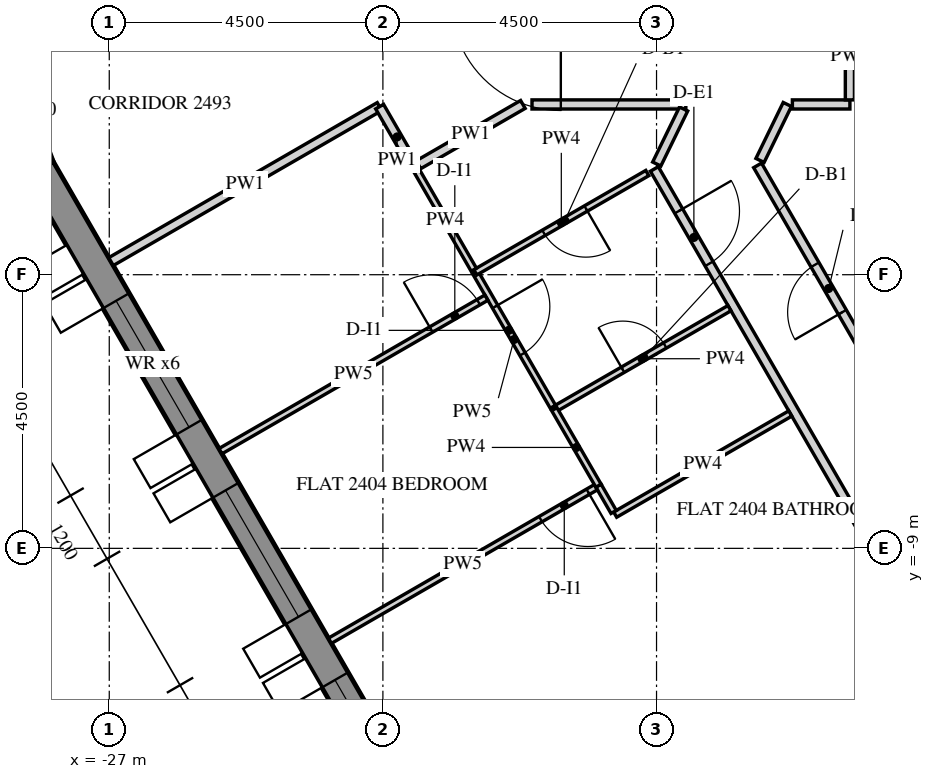
"""IFC4 building model, lengths in metres.
Left out: names, types, materials, properties, quantities, classifications, styles, units other than length and angle.
Written with IfcOpenShell. Run it as: python <this file> out.ifc"""

import sys

from ifc_helpers import new_model, si_unit, direction, frame, frame_2d, origin, place, context, subcontext, project, spatial, polyline, rectangle, outline, extrude, element, fill, save


model = new_model("IFC4")
c1 = context("Model", 3, precision=1e-05, world=origin(), true_north=direction((0.0, 1.0)))
c2 = subcontext(c1, "Body", "Model", "MODEL_VIEW")
j1 = project(units=[si_unit("LENGTHUNIT", "METRE"), si_unit("PLANEANGLEUNIT", "RADIAN")], contexts=[c1])
p1 = place(None, origin())
s1 = spatial("IfcSite", under=j1, at=p1, CompositionType="ELEMENT")
p2 = place(p1, origin())
s2 = spatial("IfcBuilding", under=s1, at=p2, CompositionType="ELEMENT")
p3 = place(p2, frame((0.0, 0.0, 303.0)))
s3 = spatial("IfcBuildingStorey", under=s2, at=p3, CompositionType="ELEMENT", Elevation=303.0)
p4 = place(p3, frame((-28.578, -1.606, -0.15), z_axis=(0.0, 0.0, 1.0), x_axis=(0.352838463023, -0.935684251771, 0.0)))
e1 = element("IfcWall", 1, at=p4, inside=s3, PredefinedType="SOLIDWALL", context=c2, shape_type="SweptSolid", body=[
    extrude(outline(polyline([(-0.041, -0.25), (1.237, -0.25), (1.196, 0.25), (0.041, 0.25), (-0.041, -0.25)])), origin(), (0.0, 0.0, 1.0), 3.9),
])
p5 = place(p3, frame((-28.149, -2.745, -0.15), z_axis=(0.0, 0.0, 1.0), x_axis=(0.500003737743, -0.866023245787, 0.0)))
e2 = element("IfcWall", 2, at=p5, inside=s3, PredefinedType="SOLIDWALL", context=c2, shape_type="SweptSolid", body=[
    extrude(outline(polyline([(-0.021, -0.25), (25.468, -0.25), (25.421, 0.25), (0.021, 0.25), (-0.021, -0.25)])), origin(), (0.0, 0.0, 1.0), 3.9),
])
p6 = place(p5, frame((2.522, 0.0, 0.75)))
e3 = element("IfcOpeningElement", 3, at=p6, cuts=e2, PredefinedType="OPENING", context=c2, shape_type="SweptSolid", body=[
    extrude(rectangle(XDim=2.4, YDim=2.7, at=frame_2d((1.2, 1.35))), frame((0.0, 0.26, 0.0), z_axis=(0.0, -1.0, 0.0), x_axis=(1.0, 0.0, 0.0)), (0.0, 0.0, 1.0), 0.52),
])
p7 = place(p5, frame((6.122, 0.0, 0.75)))
e4 = element("IfcOpeningElement", 4, at=p7, cuts=e2, PredefinedType="OPENING", context=c2, shape_type="SweptSolid", body=[
    extrude(rectangle(XDim=2.4, YDim=2.7, at=frame_2d((1.2, 1.35))), frame((0.0, 0.26, 0.0), z_axis=(0.0, -1.0, 0.0), x_axis=(1.0, 0.0, 0.0)), (0.0, 0.0, 1.0), 0.52),
])
p8 = place(p5, frame((9.722, 0.0, 0.75)))
e5 = element("IfcOpeningElement", 5, at=p8, cuts=e2, PredefinedType="OPENING", context=c2, shape_type="SweptSolid", body=[
    extrude(rectangle(XDim=2.4, YDim=2.7, at=frame_2d((1.2, 1.35))), frame((0.0, 0.26, 0.0), z_axis=(0.0, -1.0, 0.0), x_axis=(1.0, 0.0, 0.0)), (0.0, 0.0, 1.0), 0.52),
])
p9 = place(p5, frame((13.323, 0.0, 0.75)))
e6 = element("IfcOpeningElement", 6, at=p9, cuts=e2, PredefinedType="OPENING", context=c2, shape_type="SweptSolid", body=[
    extrude(rectangle(XDim=2.4, YDim=2.7, at=frame_2d((1.2, 1.35))), frame((0.0, 0.26, 0.0), z_axis=(0.0, -1.0, 0.0), x_axis=(1.0, 0.0, 0.0)), (0.0, 0.0, 1.0), 0.52),
])
p10 = place(p5, frame((16.922, 0.0, 0.75)))
e7 = element("IfcOpeningElement", 7, at=p10, cuts=e2, PredefinedType="OPENING", context=c2, shape_type="SweptSolid", body=[
    extrude(rectangle(XDim=2.4, YDim=2.7, at=frame_2d((1.2, 1.35))), frame((0.0, 0.26, 0.0), z_axis=(0.0, -1.0, 0.0), x_axis=(1.0, 0.0, 0.0)), (0.0, 0.0, 1.0), 0.52),
])
p11 = place(p5, frame((20.522, 0.0, 0.75)))
e8 = element("IfcOpeningElement", 8, at=p11, cuts=e2, PredefinedType="OPENING", context=c2, shape_type="SweptSolid", body=[
    extrude(rectangle(XDim=2.4, YDim=2.7, at=frame_2d((1.2, 1.35))), frame((0.0, 0.26, 0.0), z_axis=(0.0, -1.0, 0.0), x_axis=(1.0, 0.0, 0.0)), (0.0, 0.0, 1.0), 0.52),
])
p12 = place(p3, frame((-18.036, -2.761, 0.0), z_axis=(0.0, 0.0, 1.0), x_axis=(0.499996279807, -0.866027551628, 0.0)))
e9 = element("IfcWall", 9, at=p12, inside=s3, PredefinedType="PARTITIONING", context=c2, shape_type="SweptSolid", body=[
    extrude(rectangle(XDim=15.024, YDim=0.15, at=frame_2d((7.512, 0.0))), origin(), (0.0, 0.0, 1.0), 2.988),
])
p13 = place(p12, frame((0.8, 0.0, 0.0)))
e10 = element("IfcOpeningElement", 10, at=p13, cuts=e9, PredefinedType="OPENING", context=c2, shape_type="SweptSolid", body=[
    extrude(rectangle(XDim=1.0, YDim=2.1, at=frame_2d((0.5, 1.05))), frame((0.0, 0.085, 0.0), z_axis=(0.0, -1.0, 0.0), x_axis=(1.0, 0.0, 0.0)), (0.0, 0.0, 1.0), 0.17),
])
p14 = place(p12, frame((13.874, 0.0, 0.0)))
e11 = element("IfcOpeningElement", 11, at=p14, cuts=e9, PredefinedType="OPENING", context=c2, shape_type="SweptSolid", body=[
    extrude(rectangle(XDim=1.0, YDim=2.1, at=frame_2d((0.5, 1.05))), frame((0.0, 0.085, 0.0), z_axis=(0.0, -1.0, 0.0), x_axis=(1.0, 0.0, 0.0)), (0.0, 0.0, 1.0), 0.17),
])
p15 = place(p3, frame((-26.971, -4.284, 0.0), z_axis=(0.0, 0.0, 1.0), x_axis=(0.866024511559, 0.500001545377, 0.0)))
e12 = element("IfcWall", 12, at=p15, inside=s3, PredefinedType="PARTITIONING", context=c2, shape_type="SweptSolid", body=[
    extrude(rectangle(XDim=5.099, YDim=0.15, at=frame_2d((2.549, 0.0))), origin(), (0.0, 0.0, 1.0), 2.988),
])
p16 = place(p3, frame((-22.554, -1.736, 0.0), z_axis=(0.0, 0.0, 1.0), x_axis=(0.500040764516, -0.866001867101, 0.0)))
e13 = element("IfcWall", 13, at=p16, inside=s3, PredefinedType="PARTITIONING", context=c2, shape_type="SweptSolid", body=[
    extrude(rectangle(XDim=1.151, YDim=0.15, at=frame_2d((0.575, 0.0))), origin(), (0.0, 0.0, 1.0), 2.988),
])
p17 = place(p3, frame((-21.915, -2.692, 0.0), z_axis=(0.0, 0.0, 1.0), x_axis=(0.866007234284, 0.500031469177, 0.0)))
e14 = element("IfcWall", 14, at=p17, inside=s3, PredefinedType="PARTITIONING", context=c2, shape_type="SweptSolid", body=[
    extrude(rectangle(XDim=1.983, YDim=0.15, at=frame_2d((0.992, 0.0))), origin(), (0.0, 0.0, 1.0), 2.988),
])
p18 = place(p3, frame((-20.048, -1.7, 0.0), z_axis=(0.0, 0.0, 1.0), x_axis=(1.0, 0.0, 0.0)))
e15 = element("IfcWall", 15, at=p18, inside=s3, PredefinedType="PARTITIONING", context=c2, shape_type="SweptSolid", body=[
    extrude(rectangle(XDim=2.53, YDim=0.15, at=frame_2d((1.265, 0.0))), origin(), (0.0, 0.0, 1.0), 2.988),
])
p19 = place(p3, frame((-17.555, -1.775, 0.0), z_axis=(0.0, 0.0, 1.0), x_axis=(-0.438366307753, -0.898796406439, 0.0)))
e16 = element("IfcWall", 16, at=p19, inside=s3, PredefinedType="PARTITIONING", context=c2, shape_type="SweptSolid", body=[
    extrude(rectangle(XDim=1.007, YDim=0.15, at=frame_2d((0.503, 0.0))), origin(), (0.0, 0.0, 1.0), 2.988),
])
p20 = place(p3, frame((-14.0, -6.751, 0.0), z_axis=(0.0, 0.0, 1.0), x_axis=(-0.500008739126, 0.866020358189, 0.0)))
e17 = element("IfcWall", 17, at=p20, inside=s3, PredefinedType="PARTITIONING", context=c2, shape_type="SweptSolid", body=[
    extrude(rectangle(XDim=4.675, YDim=0.15, at=frame_2d((2.338, 0.0))), origin(), (0.0, 0.0, 1.0), 2.988),
])
p21 = place(p20, frame((1.888, 0.0, 0.0)))
e18 = element("IfcOpeningElement", 18, at=p21, cuts=e17, PredefinedType="OPENING", context=c2, shape_type="SweptSolid", body=[
    extrude(rectangle(XDim=0.9, YDim=2.1, at=frame_2d((0.45, 1.05))), frame((0.0, 0.085, 0.0), z_axis=(0.0, -1.0, 0.0), x_axis=(1.0, 0.0, 0.0)), (0.0, 0.0, 1.0), 0.17),
])
p22 = place(p3, frame((-16.298, -2.621, 0.0), z_axis=(0.0, 0.0, 1.0), x_axis=(0.438325013788, 0.898816545402, 0.0)))
e19 = element("IfcWall", 19, at=p22, inside=s3, PredefinedType="PARTITIONING", context=c2, shape_type="SweptSolid", body=[
    extrude(rectangle(XDim=1.024, YDim=0.15, at=frame_2d((0.512, 0.0))), origin(), (0.0, 0.0, 1.0), 2.988),
])
p23 = place(p3, frame((-15.766, -1.7, 0.0), z_axis=(0.0, 0.0, 1.0), x_axis=(1.0, 0.0, 0.0)))
e20 = element("IfcWall", 20, at=p23, inside=s3, PredefinedType="PARTITIONING", context=c2, shape_type="SweptSolid", body=[
    extrude(rectangle(XDim=0.946, YDim=0.15, at=frame_2d((0.473, 0.0))), origin(), (0.0, 0.0, 1.0), 2.988),
])
p24 = place(p3, frame((-14.82, -1.625, 0.0), z_axis=(0.0, 0.0, 1.0), x_axis=(0.0, 1.0, 0.0)))
e21 = element("IfcWall", 21, at=p24, inside=s3, PredefinedType="PARTITIONING", context=c2, shape_type="SweptSolid", body=[
    extrude(rectangle(XDim=1.425, YDim=0.15, at=frame_2d((0.712, 0.0))), origin(), (0.0, 0.0, 1.0), 2.988),
])
p25 = place(p3, frame((-15.801, -6.782, 0.0), z_axis=(0.0, 0.0, 1.0), x_axis=(-0.866033959199, -0.499985181294, 0.0)))
e22 = element("IfcWall", 22, at=p25, inside=s3, PredefinedType="PARTITIONING", context=c2, shape_type="SweptSolid", body=[
    extrude(rectangle(XDim=3.325, YDim=0.1, at=frame_2d((1.662, 0.0))), origin(), (0.0, 0.0, 1.0), 2.988),
])
p26 = place(p3, frame((-18.705, -8.402, 0.0), z_axis=(0.0, 0.0, 1.0), x_axis=(-0.499863173377, 0.866104386261, 0.0)))
e23 = element("IfcWall", 23, at=p26, inside=s3, PredefinedType="PARTITIONING", context=c2, shape_type="SweptSolid", body=[
    extrude(rectangle(XDim=0.501, YDim=0.1, at=frame_2d((0.25, 0.0))), origin(), (0.0, 0.0, 1.0), 2.988),
])
p27 = place(p3, frame((-18.998, -7.995, 0.0), z_axis=(0.0, 0.0, 1.0), x_axis=(-0.866039067339, -0.499976333282, 0.0)))
e24 = element("IfcWall", 24, at=p27, inside=s3, PredefinedType="PARTITIONING", context=c2, shape_type="SweptSolid", body=[
    extrude(rectangle(XDim=5.05, YDim=0.1, at=frame_2d((2.525, 0.0))), origin(), (0.0, 0.0, 1.0), 2.988),
])
p28 = place(p27, frame((0.15, 0.0, 0.0)))
e25 = element("IfcOpeningElement", 25, at=p28, cuts=e24, PredefinedType="OPENING", context=c2, shape_type="SweptSolid", body=[
    extrude(rectangle(XDim=0.9, YDim=2.1, at=frame_2d((0.45, 1.05))), frame((0.0, 0.06, 0.0), z_axis=(0.0, -1.0, 0.0), x_axis=(1.0, 0.0, 0.0)), (0.0, 0.0, 1.0), 0.12),
])
p29 = place(p3, frame((-19.68, -6.713, 0.0), z_axis=(0.0, 0.0, 1.0), x_axis=(0.866002163101, 0.500040251884, 0.0)))
e26 = element("IfcWall", 26, at=p29, inside=s3, PredefinedType="PARTITIONING", context=c2, shape_type="SweptSolid", body=[
    extrude(rectangle(XDim=3.325, YDim=0.1, at=frame_2d((1.663, 0.0))), origin(), (0.0, 0.0, 1.0), 2.988),
])
p30 = place(p29, frame((1.3, 0.0, 0.0)))
e27 = element("IfcOpeningElement", 27, at=p30, cuts=e26, PredefinedType="OPENING", context=c2, shape_type="SweptSolid", body=[
    extrude(rectangle(XDim=0.8, YDim=2.1, at=frame_2d((0.4, 1.05))), frame((0.0, 0.06, 0.0), z_axis=(0.0, -1.0, 0.0), x_axis=(1.0, 0.0, 0.0)), (0.0, 0.0, 1.0), 0.12),
])
p31 = place(p3, frame((-20.981, -4.459, 0.0), z_axis=(0.0, 0.0, 1.0), x_axis=(0.500056202316, -0.865992952931, 0.0)))
e28 = element("IfcWall", 28, at=p31, inside=s3, PredefinedType="PARTITIONING", context=c2, shape_type="SweptSolid", body=[
    extrude(rectangle(XDim=2.554, YDim=0.1, at=frame_2d((1.277, 0.0))), origin(), (0.0, 0.0, 1.0), 2.988),
])
p32 = place(p31, frame((0.653, 0.0, 0.0)))
e29 = element("IfcOpeningElement", 29, at=p32, cuts=e28, PredefinedType="OPENING", context=c2, shape_type="SweptSolid", body=[
    extrude(rectangle(XDim=0.9, YDim=2.1, at=frame_2d((0.45, 1.05))), frame((0.0, 0.06, 0.0), z_axis=(0.0, -1.0, 0.0), x_axis=(1.0, 0.0, 0.0)), (0.0, 0.0, 1.0), 0.12),
])
p33 = place(p3, frame((-18.152, -2.828, 0.0), z_axis=(0.0, 0.0, 1.0), x_axis=(-0.866012548765, -0.500022264885, 0.0)))
e30 = element("IfcWall", 30, at=p33, inside=s3, PredefinedType="PARTITIONING", context=c2, shape_type="SweptSolid", body=[
    extrude(rectangle(XDim=3.266, YDim=0.1, at=frame_2d((1.633, 0.0))), origin(), (0.0, 0.0, 1.0), 2.988),
])
p34 = place(p33, frame((1.166, 0.0, 0.0)))
e31 = element("IfcOpeningElement", 31, at=p34, cuts=e30, PredefinedType="OPENING", context=c2, shape_type="SweptSolid", body=[
    extrude(rectangle(XDim=0.8, YDim=2.1, at=frame_2d((0.4, 1.05))), frame((0.0, 0.06, 0.0), z_axis=(0.0, -1.0, 0.0), x_axis=(1.0, 0.0, 0.0)), (0.0, 0.0, 1.0), 0.12),
])
p35 = place(p3, frame((-19.681, -6.711, 0.0), z_axis=(0.0, 0.0, 1.0), x_axis=(0.499969679245, -0.866042908773, 0.0)))
e32 = element("IfcWall", 32, at=p35, inside=s3, PredefinedType="PARTITIONING", context=c2, shape_type="SweptSolid", body=[
    extrude(rectangle(XDim=1.453, YDim=0.1, at=frame_2d((0.727, 0.0))), origin(), (0.0, 0.0, 1.0), 2.988),
])
p36 = place(p3, frame((-25.171, -7.402, 0.0), z_axis=(0.0, 0.0, 1.0), x_axis=(0.866026981659, 0.499997267031, 0.0)))
e33 = element("IfcWall", 33, at=p36, inside=s3, PredefinedType="PARTITIONING", context=c2, shape_type="SweptSolid", body=[
    extrude(rectangle(XDim=5.05, YDim=0.1, at=frame_2d((2.525, 0.0))), origin(), (0.0, 0.0, 1.0), 2.988),
])
p37 = place(p36, frame((4.0, 0.0, 0.0)))
e34 = element("IfcOpeningElement", 34, at=p37, cuts=e33, PredefinedType="OPENING", context=c2, shape_type="SweptSolid", body=[
    extrude(rectangle(XDim=0.9, YDim=2.1, at=frame_2d((0.45, 1.05))), frame((0.0, 0.06, 0.0), z_axis=(0.0, -1.0, 0.0), x_axis=(1.0, 0.0, 0.0)), (0.0, 0.0, 1.0), 0.12),
])
p38 = place(p3, frame((-21.005, -4.418, 0.0), z_axis=(0.0, 0.0, 1.0), x_axis=(-0.500004234368, 0.866022959057, 0.0)))
e35 = element("IfcWall", 35, at=p38, inside=s3, PredefinedType="PARTITIONING", context=c2, shape_type="SweptSolid", body=[
    extrude(rectangle(XDim=1.875, YDim=0.1, at=frame_2d((0.938, 0.0))), origin(), (0.0, 0.0, 1.0), 2.988),
])
p39 = place(p6, frame((0.0, 0.18, 0.0)))
e36 = element("IfcWindow", 36, at=p39, inside=s3, PartitioningType="DOUBLE_PANEL_VERTICAL", PredefinedType="WINDOW", context=c2, shape_type="SweptSolid", body=[
    extrude(rectangle(XDim=2.4, YDim=2.7, at=frame_2d((1.2, 1.35))), frame((0.0, 0.03, 0.0), z_axis=(0.0, -1.0, 0.0), x_axis=(1.0, 0.0, 0.0)), (0.0, 0.0, 1.0), 0.06),
])
fill(e3, e36)
p40 = place(p7, frame((0.0, 0.18, 0.0)))
e37 = element("IfcWindow", 37, at=p40, inside=s3, PartitioningType="DOUBLE_PANEL_VERTICAL", PredefinedType="WINDOW", context=c2, shape_type="SweptSolid", body=[
    extrude(rectangle(XDim=2.4, YDim=2.7, at=frame_2d((1.2, 1.35))), frame((0.0, 0.03, 0.0), z_axis=(0.0, -1.0, 0.0), x_axis=(1.0, 0.0, 0.0)), (0.0, 0.0, 1.0), 0.06),
])
fill(e4, e37)
p41 = place(p8, frame((0.0, 0.18, 0.0)))
e38 = element("IfcWindow", 38, at=p41, inside=s3, PartitioningType="DOUBLE_PANEL_VERTICAL", PredefinedType="WINDOW", context=c2, shape_type="SweptSolid", body=[
    extrude(rectangle(XDim=2.4, YDim=2.7, at=frame_2d((1.2, 1.35))), frame((0.0, 0.03, 0.0), z_axis=(0.0, -1.0, 0.0), x_axis=(1.0, 0.0, 0.0)), (0.0, 0.0, 1.0), 0.06),
])
fill(e5, e38)
p42 = place(p13, origin())
e39 = element("IfcDoor", 39, at=p42, inside=s3, OperationType="SINGLE_SWING_RIGHT", PredefinedType="DOOR", context=c2, shape_type="SweptSolid", body=[
    extrude(rectangle(XDim=1.0, YDim=2.1, at=frame_2d((0.5, 1.05))), frame((0.0, 0.025, 0.0), z_axis=(0.0, -1.0, 0.0), x_axis=(1.0, 0.0, 0.0)), (0.0, 0.0, 1.0), 0.05),
])
fill(e10, e39)
p43 = place(p30, origin())
e40 = element("IfcDoor", 40, at=p43, inside=s3, OperationType="SINGLE_SWING_LEFT", PredefinedType="DOOR", context=c2, shape_type="SweptSolid", body=[
    extrude(rectangle(XDim=0.8, YDim=2.1, at=frame_2d((0.4, 1.05))), frame((0.0, 0.025, 0.0), z_axis=(0.0, -1.0, 0.0), x_axis=(1.0, 0.0, 0.0)), (0.0, 0.0, 1.0), 0.05),
])
fill(e27, e40)
p44 = place(p32, origin())
e41 = element("IfcDoor", 41, at=p44, inside=s3, OperationType="SINGLE_SWING_LEFT", PredefinedType="DOOR", context=c2, shape_type="SweptSolid", body=[
    extrude(rectangle(XDim=0.9, YDim=2.1, at=frame_2d((0.45, 1.05))), frame((0.0, 0.025, 0.0), z_axis=(0.0, -1.0, 0.0), x_axis=(1.0, 0.0, 0.0)), (0.0, 0.0, 1.0), 0.05),
])
fill(e29, e41)
p45 = place(p37, origin())
e42 = element("IfcDoor", 42, at=p45, inside=s3, OperationType="SINGLE_SWING_RIGHT", PredefinedType="DOOR", context=c2, shape_type="SweptSolid", body=[
    extrude(rectangle(XDim=0.9, YDim=2.1, at=frame_2d((0.45, 1.05))), frame((0.0, 0.025, 0.0), z_axis=(0.0, -1.0, 0.0), x_axis=(1.0, 0.0, 0.0)), (0.0, 0.0, 1.0), 0.05),
])
fill(e34, e42)
p46 = place(p28, origin())
e43 = element("IfcDoor", 43, at=p46, inside=s3, OperationType="SINGLE_SWING_RIGHT", PredefinedType="DOOR", context=c2, shape_type="SweptSolid", body=[
    extrude(rectangle(XDim=0.9, YDim=2.1, at=frame_2d((0.45, 1.05))), frame((0.0, 0.025, 0.0), z_axis=(0.0, -1.0, 0.0), x_axis=(1.0, 0.0, 0.0)), (0.0, 0.0, 1.0), 0.05),
])
fill(e25, e43)
p47 = place(p34, origin())
e44 = element("IfcDoor", 44, at=p47, inside=s3, OperationType="SINGLE_SWING_RIGHT", PredefinedType="DOOR", context=c2, shape_type="SweptSolid", body=[
    extrude(rectangle(XDim=0.8, YDim=2.1, at=frame_2d((0.4, 1.05))), frame((0.0, 0.025, 0.0), z_axis=(0.0, -1.0, 0.0), x_axis=(1.0, 0.0, 0.0)), (0.0, 0.0, 1.0), 0.05),
])
fill(e31, e44)
p48 = place(p21, origin())
e45 = element("IfcDoor", 45, at=p48, inside=s3, OperationType="SINGLE_SWING_RIGHT", PredefinedType="DOOR", context=c2, shape_type="SweptSolid", body=[
    extrude(rectangle(XDim=0.9, YDim=2.1, at=frame_2d((0.45, 1.05))), frame((0.0, 0.025, 0.0), z_axis=(0.0, -1.0, 0.0), x_axis=(1.0, 0.0, 0.0)), (0.0, 0.0, 1.0), 0.05),
])
fill(e18, e45)
save(model, sys.argv[1])
